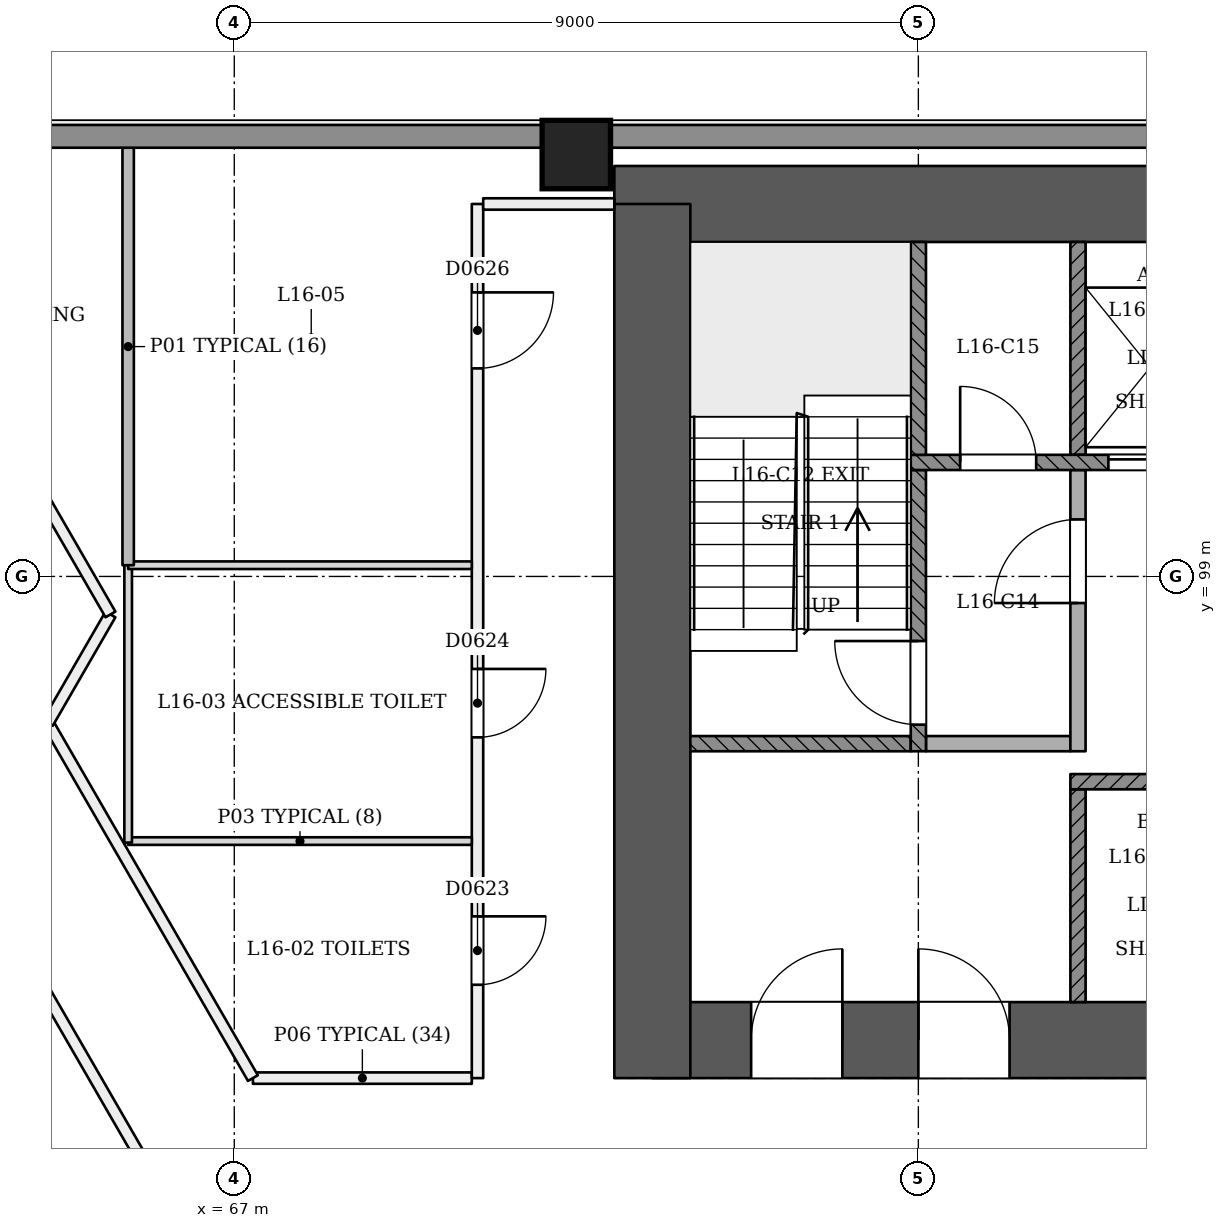
"""IFC4 building model, lengths in metres.
Left out: names, types, materials, properties, quantities, classifications, styles, units other than length and angle.
Written with IfcOpenShell. Run it as: python <this file> out.ifc"""

import sys

from ifc_helpers import new_model, si_unit, direction, frame, frame_2d, origin, origin_2d, place, context, subcontext, project, spatial, rectangle, extrude, element, fill, save


model = new_model("IFC4")
c1 = context("Model", 3, precision=1e-05, world=origin(), true_north=direction((0.0, 1.0)))
c2 = subcontext(c1, "Body", "Model", "MODEL_VIEW")
j1 = project(units=[si_unit("LENGTHUNIT", "METRE"), si_unit("PLANEANGLEUNIT", "RADIAN")], contexts=[c1])
p1 = place(None, origin())
s1 = spatial("IfcSite", under=j1, at=p1, CompositionType="ELEMENT")
p2 = place(p1, origin())
s2 = spatial("IfcBuilding", under=s1, at=p2, CompositionType="ELEMENT")
p3 = place(p2, frame((0.0, 0.0, 66.6)))
s3 = spatial("IfcBuildingStorey", under=s2, at=p3, CompositionType="ELEMENT", Elevation=66.6)
p4 = place(p3, frame((72.5, 92.9, 0.0), z_axis=(0.0, 0.0, 1.0), x_axis=(1.0, 0.0, 0.0)))
e1 = element("IfcWall", 1, at=p4, inside=s3, PredefinedType="SHEAR", context=c2, shape_type="SweptSolid", body=[
    extrude(rectangle(XDim=25.5, YDim=1.0, at=frame_2d((12.75, 0.0))), origin(), (0.0, 0.0, 1.0), 3.6),
])
p5 = place(p4, frame((1.3, 0.0, 0.0)))
e2 = element("IfcOpeningElement", 2, at=p5, cuts=e1, PredefinedType="OPENING", context=c2, shape_type="SweptSolid", body=[
    extrude(rectangle(XDim=1.2, YDim=2.1, at=frame_2d((0.6, 1.05))), frame((0.0, 0.51, 0.0), z_axis=(0.0, -1.0, 0.0), x_axis=(1.0, 0.0, 0.0)), (0.0, 0.0, 1.0), 1.021),
])
p6 = place(p4, frame((3.5, 0.0, 0.0)))
e3 = element("IfcOpeningElement", 3, at=p6, cuts=e1, PredefinedType="OPENING", context=c2, shape_type="SweptSolid", body=[
    extrude(rectangle(XDim=1.2, YDim=2.1, at=frame_2d((0.6, 1.05))), frame((0.0, 0.51, 0.0), z_axis=(0.0, -1.0, 0.0), x_axis=(1.0, 0.0, 0.0)), (0.0, 0.0, 1.0), 1.021),
])
p7 = place(p4, frame((13.5, 0.0, 0.0)))
e4 = element("IfcOpeningElement", 4, at=p7, cuts=e1, PredefinedType="OPENING", context=c2, shape_type="SweptSolid", body=[
    extrude(rectangle(XDim=1.2, YDim=2.1, at=frame_2d((0.6, 1.05))), frame((0.0, 0.51, 0.0), z_axis=(0.0, -1.0, 0.0), x_axis=(1.0, 0.0, 0.0)), (0.0, 0.0, 1.0), 1.021),
])
p8 = place(p4, frame((16.363, 0.0, 0.0)))
e5 = element("IfcOpeningElement", 5, at=p8, cuts=e1, PredefinedType="OPENING", context=c2, shape_type="SweptSolid", body=[
    extrude(rectangle(XDim=1.0, YDim=2.1, at=frame_2d((0.5, 1.05))), frame((0.0, 0.51, 0.0), z_axis=(0.0, -1.0, 0.0), x_axis=(1.0, 0.0, 0.0)), (0.0, 0.0, 1.0), 1.021),
])
p9 = place(p4, frame((19.8, 0.0, 0.0)))
e6 = element("IfcOpeningElement", 6, at=p9, cuts=e1, PredefinedType="OPENING", context=c2, shape_type="SweptSolid", body=[
    extrude(rectangle(XDim=1.0, YDim=2.1, at=frame_2d((0.5, 1.05))), frame((0.0, 0.51, 0.0), z_axis=(0.0, -1.0, 0.0), x_axis=(1.0, 0.0, 0.0)), (0.0, 0.0, 1.0), 1.021),
])
p10 = place(p4, frame((22.788, 0.0, 0.0)))
e7 = element("IfcOpeningElement", 7, at=p10, cuts=e1, PredefinedType="OPENING", context=c2, shape_type="SweptSolid", body=[
    extrude(rectangle(XDim=1.0, YDim=2.1, at=frame_2d((0.5, 1.05))), frame((0.0, 0.51, 0.0), z_axis=(0.0, -1.0, 0.0), x_axis=(1.0, 0.0, 0.0)), (0.0, 0.0, 1.0), 1.021),
])
p11 = place(p3, frame((97.5, 103.9, 0.0), z_axis=(0.0, 0.0, 1.0), x_axis=(-1.0, 0.0, 0.0)))
e8 = element("IfcWall", 8, at=p11, inside=s3, PredefinedType="SHEAR", context=c2, shape_type="SweptSolid", body=[
    extrude(rectangle(XDim=25.5, YDim=1.0, at=frame_2d((12.75, 0.0))), origin(), (0.0, 0.0, 1.0), 3.6),
])
p12 = place(p3, frame((72.5, 103.9, 0.0), z_axis=(0.0, 0.0, 1.0), x_axis=(0.0, -1.0, 0.0)))
e9 = element("IfcWall", 9, at=p12, inside=s3, PredefinedType="SHEAR", context=c2, shape_type="SweptSolid", body=[
    extrude(rectangle(XDim=11.5, YDim=1.0, at=frame_2d((5.75, 0.0))), origin(), (0.0, 0.0, 1.0), 3.6),
])
p13 = place(p3, frame((71.5, 104.55, 0.0), z_axis=(0.0, 0.0, 1.0), x_axis=(1.0, 0.0, 0.0)))
e10 = element("IfcColumn", 10, at=p13, inside=s3, PredefinedType="COLUMN", context=c2, shape_type="SweptSolid", body=[
    extrude(rectangle(XDim=0.9, YDim=0.9, at=origin_2d()), origin(), (0.0, 0.0, 1.0), 3.6),
])
p14 = place(p3, frame((70.125, 92.4, 0.0), z_axis=(0.0, 0.0, 1.0), x_axis=(-1.0, 0.0, 0.0)))
e11 = element("IfcWall", 11, at=p14, inside=s3, PredefinedType="PARTITIONING", context=c2, shape_type="SweptSolid", body=[
    extrude(rectangle(XDim=2.88, YDim=0.15, at=frame_2d((1.44, 0.0))), origin(), (0.0, 0.0, 1.0), 3.1),
])
p15 = place(p3, frame((67.245, 92.4, 0.0), z_axis=(0.0, 0.0, 1.0), x_axis=(-0.499997913005, 0.866026608708, 0.0)))
e12 = element("IfcWall", 12, at=p15, inside=s3, PredefinedType="PARTITIONING", context=c2, shape_type="SweptSolid", body=[
    extrude(rectangle(XDim=5.396, YDim=0.15, at=frame_2d((2.698, 0.0))), origin(), (0.0, 0.0, 1.0), 3.1),
])
p16 = place(p3, frame((70.2, 103.9, 0.0), z_axis=(0.0, 0.0, 1.0), x_axis=(0.0, -1.0, 0.0)))
e13 = element("IfcWall", 13, at=p16, inside=s3, PredefinedType="PARTITIONING", context=c2, shape_type="SweptSolid", body=[
    extrude(rectangle(XDim=11.5, YDim=0.15, at=frame_2d((5.75, 0.0))), origin(), (0.0, 0.0, 1.0), 2.6),
])
p17 = place(p16, frame((9.372, 0.0, 0.0)))
e14 = element("IfcOpeningElement", 14, at=p17, cuts=e13, PredefinedType="OPENING", context=c2, shape_type="SweptSolid", body=[
    extrude(rectangle(XDim=0.9, YDim=2.1, at=frame_2d((0.45, 1.05))), frame((0.0, 0.085, 0.0), z_axis=(0.0, -1.0, 0.0), x_axis=(1.0, 0.0, 0.0)), (0.0, 0.0, 1.0), 0.171),
])
p18 = place(p16, frame((6.117, 0.0, 0.0)))
e15 = element("IfcOpeningElement", 15, at=p18, cuts=e13, PredefinedType="OPENING", context=c2, shape_type="SweptSolid", body=[
    extrude(rectangle(XDim=0.9, YDim=2.1, at=frame_2d((0.45, 1.05))), frame((0.0, 0.085, 0.0), z_axis=(0.0, -1.0, 0.0), x_axis=(1.0, 0.0, 0.0)), (0.0, 0.0, 1.0), 0.171),
])
p19 = place(p16, frame((1.163, 0.0, 0.0)))
e16 = element("IfcOpeningElement", 16, at=p19, cuts=e13, PredefinedType="OPENING", context=c2, shape_type="SweptSolid", body=[
    extrude(rectangle(XDim=1.0, YDim=2.1, at=frame_2d((0.5, 1.05))), frame((0.0, 0.085, 0.0), z_axis=(0.0, -1.0, 0.0), x_axis=(1.0, 0.0, 0.0)), (0.0, 0.0, 1.0), 0.171),
])
p20 = place(p3, frame((64.547, 97.073, 0.0), z_axis=(0.0, 0.0, 1.0), x_axis=(0.500043078269, 0.866000531106, 0.0)))
e17 = element("IfcWall", 17, at=p20, inside=s3, PredefinedType="PARTITIONING", context=c2, shape_type="SweptSolid", body=[
    extrude(rectangle(XDim=1.648, YDim=0.15, at=frame_2d((0.824, 0.0))), origin(), (0.0, 0.0, 1.0), 3.1),
])
p21 = place(p3, frame((65.371, 98.5, 0.0), z_axis=(0.0, 0.0, 1.0), x_axis=(-0.500005024956, 0.866022502605, 0.0)))
e18 = element("IfcWall", 18, at=p21, inside=s3, PredefinedType="PARTITIONING", context=c2, shape_type="SweptSolid", body=[
    extrude(rectangle(XDim=2.194, YDim=0.15, at=frame_2d((1.097, 0.0))), origin(), (0.0, 0.0, 1.0), 3.1),
])
p22 = place(p3, frame((72.0, 103.9, 0.0), z_axis=(0.0, 0.0, 1.0), x_axis=(-1.0, 0.0, 0.0)))
e19 = element("IfcWall", 19, at=p22, inside=s3, PredefinedType="PARTITIONING", context=c2, shape_type="SweptSolid", body=[
    extrude(rectangle(XDim=1.725, YDim=0.15, at=frame_2d((0.863, 0.0))), origin(), (0.0, 0.0, 1.0), 2.6),
])
p23 = place(p3, frame((62.458, 97.093, 0.0), z_axis=(0.0, 0.0, 1.0), x_axis=(0.499998802074, -0.866026095406, 0.0)))
e20 = element("IfcWall", 20, at=p23, inside=s3, PredefinedType="PARTITIONING", context=c2, shape_type="SweptSolid", body=[
    extrude(rectangle(XDim=43.437, YDim=0.15, at=frame_2d((21.719, 0.0))), origin(), (0.0, 0.0, 1.0), 2.7),
])
p24 = place(p23, frame((0.286, 0.0, 0.0)))
e21 = element("IfcOpeningElement", 21, at=p24, cuts=e20, PredefinedType="OPENING", context=c2, shape_type="SweptSolid", body=[
    extrude(rectangle(XDim=1.2, YDim=2.1, at=frame_2d((0.6, 1.05))), frame((0.0, 0.085, 0.0), z_axis=(0.0, -1.0, 0.0), x_axis=(1.0, 0.0, 0.0)), (0.0, 0.0, 1.0), 0.171),
])
p25 = place(p23, frame((12.13, 0.0, 0.0)))
e22 = element("IfcOpeningElement", 22, at=p25, cuts=e20, PredefinedType="OPENING", context=c2, shape_type="SweptSolid", body=[
    extrude(rectangle(XDim=1.2, YDim=2.1, at=frame_2d((0.6, 1.05))), frame((0.0, 0.085, 0.0), z_axis=(0.0, -1.0, 0.0), x_axis=(1.0, 0.0, 0.0)), (0.0, 0.0, 1.0), 0.171),
])
p26 = place(p23, frame((18.98, 0.0, 0.0)))
e23 = element("IfcOpeningElement", 23, at=p26, cuts=e20, PredefinedType="OPENING", context=c2, shape_type="SweptSolid", body=[
    extrude(rectangle(XDim=1.0, YDim=2.1, at=frame_2d((0.5, 1.05))), frame((0.0, 0.085, 0.0), z_axis=(0.0, -1.0, 0.0), x_axis=(1.0, 0.0, 0.0)), (0.0, 0.0, 1.0), 0.171),
])
p27 = place(p23, frame((27.88, 0.0, 0.0)))
e24 = element("IfcOpeningElement", 24, at=p27, cuts=e20, PredefinedType="OPENING", context=c2, shape_type="SweptSolid", body=[
    extrude(rectangle(XDim=1.2, YDim=2.1, at=frame_2d((0.6, 1.05))), frame((0.0, 0.085, 0.0), z_axis=(0.0, -1.0, 0.0), x_axis=(1.0, 0.0, 0.0)), (0.0, 0.0, 1.0), 0.171),
])
p28 = place(p23, frame((38.745, 0.0, 0.0)))
e25 = element("IfcOpeningElement", 25, at=p28, cuts=e20, PredefinedType="OPENING", context=c2, shape_type="SweptSolid", body=[
    extrude(rectangle(XDim=1.2, YDim=2.1, at=frame_2d((0.6, 1.05))), frame((0.0, 0.085, 0.0), z_axis=(0.0, -1.0, 0.0), x_axis=(1.0, 0.0, 0.0)), (0.0, 0.0, 1.0), 0.171),
])
p29 = place(p3, frame((70.125, 95.518, 0.0), z_axis=(0.0, 0.0, 1.0), x_axis=(-1.0, 0.0, 0.0)))
e26 = element("IfcWall", 26, at=p29, inside=s3, PredefinedType="PARTITIONING", context=c2, shape_type="SweptSolid", body=[
    extrude(rectangle(XDim=4.521, YDim=0.1, at=frame_2d((2.26, 0.0))), origin(), (0.0, 0.0, 1.0), 3.1),
])
p30 = place(p3, frame((65.604, 99.168, 0.0), z_axis=(0.0, 0.0, 1.0), x_axis=(0.0, -1.0, 0.0)))
e27 = element("IfcWall", 27, at=p30, inside=s3, PredefinedType="PARTITIONING", context=c2, shape_type="SweptSolid", body=[
    extrude(rectangle(XDim=3.669, YDim=0.1, at=frame_2d((1.835, 0.0))), origin(), (0.0, 0.0, 1.0), 3.1),
])
p31 = place(p3, frame((70.125, 99.148, 0.0), z_axis=(0.0, 0.0, 1.0), x_axis=(-1.0, 0.0, 0.0)))
e28 = element("IfcWall", 28, at=p31, inside=s3, PredefinedType="PARTITIONING", context=c2, shape_type="SweptSolid", body=[
    extrude(rectangle(XDim=4.521, YDim=0.1, at=frame_2d((2.26, 0.0))), origin(), (0.0, 0.0, 1.0), 3.1),
])
p32 = place(p3, frame((65.604, 99.148, 0.0), z_axis=(0.0, 0.0, 1.0), x_axis=(0.0, 1.0, 0.0)))
e29 = element("IfcWall", 29, at=p32, inside=s3, PredefinedType="PARTITIONING", context=c2, shape_type="SweptSolid", body=[
    extrude(rectangle(XDim=5.752, YDim=0.15, at=frame_2d((2.876, 0.0))), origin(), (0.0, 0.0, 1.0), 2.6),
])
p33 = place(p3, frame((59.54, 104.79, 0.0), z_axis=(0.0, 0.0, 1.0), x_axis=(1.0, 0.0, 0.0)))
e30 = element("IfcWall", 30, at=p33, inside=s3, PredefinedType="SOLIDWALL", context=c2, shape_type="SweptSolid", body=[
    extrude(rectangle(XDim=50.92, YDim=0.3, at=frame_2d((25.46, 0.0))), origin(), (0.0, 0.0, 1.0), 2.6),
])
p34 = place(p3, frame((78.1, 93.4, 0.0), z_axis=(0.0, 0.0, 1.0), x_axis=(0.0, 1.0, 0.0)))
e31 = element("IfcWall", 31, at=p34, inside=s3, PredefinedType="SOLIDWALL", context=c2, shape_type="SweptSolid", body=[
    extrude(rectangle(XDim=2.8, YDim=0.2, at=frame_2d((1.4, 0.0))), origin(), (0.0, 0.0, 1.0), 3.1),
])
p35 = place(p3, frame((78.0, 96.3, 0.0), z_axis=(0.0, 0.0, 1.0), x_axis=(1.0, 0.0, 0.0)))
e32 = element("IfcWall", 32, at=p35, inside=s3, PredefinedType="SOLIDWALL", context=c2, shape_type="SweptSolid", body=[
    extrude(rectangle(XDim=7.8, YDim=0.2, at=frame_2d((3.9, 0.0))), origin(), (0.0, 0.0, 1.0), 3.1),
])
p36 = place(p3, frame((73.0, 96.8, 0.0), z_axis=(0.0, 0.0, 1.0), x_axis=(1.0, 0.0, 0.0)))
e33 = element("IfcWall", 33, at=p36, inside=s3, PredefinedType="SOLIDWALL", context=c2, shape_type="SweptSolid", body=[
    extrude(rectangle(XDim=2.9, YDim=0.2, at=frame_2d((1.45, 0.0))), origin(), (0.0, 0.0, 1.0), 3.1),
])
p37 = place(p3, frame((76.0, 96.7, 0.0), z_axis=(0.0, 0.0, 1.0), x_axis=(0.0, 1.0, 0.0)))
e34 = element("IfcWall", 34, at=p37, inside=s3, PredefinedType="SOLIDWALL", context=c2, shape_type="SweptSolid", body=[
    extrude(rectangle(XDim=3.7, YDim=0.2, at=frame_2d((1.85, 0.0))), origin(), (0.0, 0.0, 1.0), 3.1),
])
p38 = place(p37, frame((0.35, 0.0, 0.0)))
e35 = element("IfcOpeningElement", 35, at=p38, cuts=e34, PredefinedType="OPENING", context=c2, shape_type="SweptSolid", body=[
    extrude(rectangle(XDim=1.1, YDim=2.1, at=frame_2d((0.55, 1.05))), frame((0.0, 0.11, 0.0), z_axis=(0.0, -1.0, 0.0), x_axis=(1.0, 0.0, 0.0)), (0.0, 0.0, 1.0), 0.221),
])
p39 = place(p3, frame((76.1, 96.8, 0.0), z_axis=(0.0, 0.0, 1.0), x_axis=(1.0, 0.0, 0.0)))
e36 = element("IfcWall", 36, at=p39, inside=s3, PredefinedType="PARTITIONING", context=c2, shape_type="SweptSolid", body=[
    extrude(rectangle(XDim=1.9, YDim=0.2, at=frame_2d((0.95, 0.0))), origin(), (0.0, 0.0, 1.0), 3.1),
])
p40 = place(p3, frame((78.1, 96.7, 0.0), z_axis=(0.0, 0.0, 1.0), x_axis=(0.0, 1.0, 0.0)))
e37 = element("IfcWall", 37, at=p40, inside=s3, PredefinedType="PARTITIONING", context=c2, shape_type="SweptSolid", body=[
    extrude(rectangle(XDim=3.7, YDim=0.2, at=frame_2d((1.85, 0.0))), origin(), (0.0, 0.0, 1.0), 3.1),
])
p41 = place(p40, frame((1.95, 0.0, 0.0)))
e38 = element("IfcOpeningElement", 38, at=p41, cuts=e37, PredefinedType="OPENING", context=c2, shape_type="SweptSolid", body=[
    extrude(rectangle(XDim=1.1, YDim=2.1, at=frame_2d((0.55, 1.05))), frame((0.0, 0.11, 0.0), z_axis=(0.0, -1.0, 0.0), x_axis=(1.0, 0.0, 0.0)), (0.0, 0.0, 1.0), 0.221),
])
p42 = place(p3, frame((75.9, 100.5, 0.0), z_axis=(0.0, 0.0, 1.0), x_axis=(1.0, 0.0, 0.0)))
e39 = element("IfcWall", 39, at=p42, inside=s3, PredefinedType="SOLIDWALL", context=c2, shape_type="SweptSolid", body=[
    extrude(rectangle(XDim=18.2, YDim=0.2, at=frame_2d((9.1, 0.0))), origin(), (0.0, 0.0, 1.0), 3.1),
])
p43 = place(p42, frame((2.6, 0.0, 0.0)))
e40 = element("IfcOpeningElement", 40, at=p43, cuts=e39, PredefinedType="OPENING", context=c2, shape_type="SweptSolid", body=[
    extrude(rectangle(XDim=1.1, YDim=2.1, at=frame_2d((0.55, 1.05))), frame((0.0, 0.11, 0.0), z_axis=(0.0, -1.0, 0.0), x_axis=(1.0, 0.0, 0.0)), (0.0, 0.0, 1.0), 0.221),
])
p44 = place(p42, frame((4.5, 0.0, 0.0)))
e41 = element("IfcOpeningElement", 41, at=p44, cuts=e39, PredefinedType="OPENING", context=c2, shape_type="SweptSolid", body=[
    extrude(rectangle(XDim=1.1, YDim=2.1, at=frame_2d((0.55, 1.05))), frame((0.0, 0.11, 0.0), z_axis=(0.0, -1.0, 0.0), x_axis=(1.0, 0.0, 0.0)), (0.0, 0.0, 1.0), 0.221),
])
p45 = place(p42, frame((6.4, 0.0, 0.0)))
e42 = element("IfcOpeningElement", 42, at=p45, cuts=e39, PredefinedType="OPENING", context=c2, shape_type="SweptSolid", body=[
    extrude(rectangle(XDim=1.1, YDim=2.1, at=frame_2d((0.55, 1.05))), frame((0.0, 0.11, 0.0), z_axis=(0.0, -1.0, 0.0), x_axis=(1.0, 0.0, 0.0)), (0.0, 0.0, 1.0), 0.221),
])
p46 = place(p42, frame((8.3, 0.0, 0.0)))
e43 = element("IfcOpeningElement", 43, at=p46, cuts=e39, PredefinedType="OPENING", context=c2, shape_type="SweptSolid", body=[
    extrude(rectangle(XDim=1.1, YDim=2.1, at=frame_2d((0.55, 1.05))), frame((0.0, 0.11, 0.0), z_axis=(0.0, -1.0, 0.0), x_axis=(1.0, 0.0, 0.0)), (0.0, 0.0, 1.0), 0.221),
])
p47 = place(p42, frame((10.2, 0.0, 0.0)))
e44 = element("IfcOpeningElement", 44, at=p47, cuts=e39, PredefinedType="OPENING", context=c2, shape_type="SweptSolid", body=[
    extrude(rectangle(XDim=1.1, YDim=2.1, at=frame_2d((0.55, 1.05))), frame((0.0, 0.11, 0.0), z_axis=(0.0, -1.0, 0.0), x_axis=(1.0, 0.0, 0.0)), (0.0, 0.0, 1.0), 0.221),
])
p48 = place(p42, frame((12.1, 0.0, 0.0)))
e45 = element("IfcOpeningElement", 45, at=p48, cuts=e39, PredefinedType="OPENING", context=c2, shape_type="SweptSolid", body=[
    extrude(rectangle(XDim=1.1, YDim=2.1, at=frame_2d((0.55, 1.05))), frame((0.0, 0.11, 0.0), z_axis=(0.0, -1.0, 0.0), x_axis=(1.0, 0.0, 0.0)), (0.0, 0.0, 1.0), 0.221),
])
p49 = place(p42, frame((14.0, 0.0, 0.0)))
e46 = element("IfcOpeningElement", 46, at=p49, cuts=e39, PredefinedType="OPENING", context=c2, shape_type="SweptSolid", body=[
    extrude(rectangle(XDim=1.1, YDim=2.1, at=frame_2d((0.55, 1.05))), frame((0.0, 0.11, 0.0), z_axis=(0.0, -1.0, 0.0), x_axis=(1.0, 0.0, 0.0)), (0.0, 0.0, 1.0), 0.221),
])
p50 = place(p42, frame((0.65, 0.0, 0.0)))
e47 = element("IfcOpeningElement", 47, at=p50, cuts=e39, PredefinedType="OPENING", context=c2, shape_type="SweptSolid", body=[
    extrude(rectangle(XDim=1.0, YDim=2.1, at=frame_2d((0.5, 1.05))), frame((0.0, 0.11, 0.0), z_axis=(0.0, -1.0, 0.0), x_axis=(1.0, 0.0, 0.0)), (0.0, 0.0, 1.0), 0.221),
])
p51 = place(p42, frame((16.3, 0.0, 0.0)))
e48 = element("IfcOpeningElement", 48, at=p51, cuts=e39, PredefinedType="OPENING", context=c2, shape_type="SweptSolid", body=[
    extrude(rectangle(XDim=1.0, YDim=2.1, at=frame_2d((0.5, 1.05))), frame((0.0, 0.11, 0.0), z_axis=(0.0, -1.0, 0.0), x_axis=(1.0, 0.0, 0.0)), (0.0, 0.0, 1.0), 0.221),
])
for number, where, z_axis, x_axis in (
    (49, (76.0, 100.6, 0.0), (0.0, 0.0, 1.0), (0.0, 1.0, 0.0)),
    (50, (78.1, 100.6, 0.0), (0.0, 0.0, 1.0), (0.0, 1.0, 0.0)),
):
    element("IfcWall", number, at=place(p3, frame(where, z_axis=z_axis, x_axis=x_axis)), inside=s3, PredefinedType="SOLIDWALL", context=c2, shape_type="SweptSolid", body=[
        extrude(rectangle(XDim=2.8, YDim=0.2, at=frame_2d((1.4, 0.0))), origin(), (0.0, 0.0, 1.0), 3.1),
    ])
p52 = place(p17, origin())
e51 = element("IfcDoor", 51, at=p52, inside=s3, OperationType="SINGLE_SWING_LEFT", PredefinedType="NOTDEFINED", context=c2, shape_type="SweptSolid", body=[
    extrude(rectangle(XDim=0.9, YDim=2.1, at=frame_2d((0.45, 1.05))), frame((0.0, 0.025, 0.0), z_axis=(0.0, -1.0, 0.0), x_axis=(1.0, 0.0, 0.0)), (0.0, 0.0, 1.0), 0.05),
])
fill(e14, e51)
p53 = place(p18, origin())
e52 = element("IfcDoor", 52, at=p53, inside=s3, OperationType="SINGLE_SWING_LEFT", PredefinedType="NOTDEFINED", context=c2, shape_type="SweptSolid", body=[
    extrude(rectangle(XDim=0.9, YDim=2.1, at=frame_2d((0.45, 1.05))), frame((0.0, 0.025, 0.0), z_axis=(0.0, -1.0, 0.0), x_axis=(1.0, 0.0, 0.0)), (0.0, 0.0, 1.0), 0.05),
])
fill(e15, e52)
p54 = place(p19, origin())
e53 = element("IfcDoor", 53, at=p54, inside=s3, OperationType="SINGLE_SWING_LEFT", PredefinedType="NOTDEFINED", context=c2, shape_type="SweptSolid", body=[
    extrude(rectangle(XDim=1.0, YDim=2.1, at=frame_2d((0.5, 1.05))), frame((0.0, 0.025, 0.0), z_axis=(0.0, -1.0, 0.0), x_axis=(1.0, 0.0, 0.0)), (0.0, 0.0, 1.0), 0.05),
])
fill(e16, e53)
p55 = place(p43, origin())
e54 = element("IfcDoor", 54, at=p55, inside=s3, OperationType="SLIDING_TO_RIGHT", PredefinedType="NOTDEFINED", context=c2, shape_type="SweptSolid", body=[
    extrude(rectangle(XDim=1.1, YDim=2.1, at=frame_2d((0.55, 1.05))), frame((0.0, 0.025, 0.0), z_axis=(0.0, -1.0, 0.0), x_axis=(1.0, 0.0, 0.0)), (0.0, 0.0, 1.0), 0.05),
])
fill(e40, e54)
p56 = place(p38, origin())
e55 = element("IfcDoor", 55, at=p56, inside=s3, OperationType="SINGLE_SWING_RIGHT", PredefinedType="NOTDEFINED", context=c2, shape_type="SweptSolid", body=[
    extrude(rectangle(XDim=1.1, YDim=2.1, at=frame_2d((0.55, 1.05))), frame((0.0, 0.025, 0.0), z_axis=(0.0, -1.0, 0.0), x_axis=(1.0, 0.0, 0.0)), (0.0, 0.0, 1.0), 0.05),
])
fill(e35, e55)
p57 = place(p41, origin())
e56 = element("IfcDoor", 56, at=p57, inside=s3, OperationType="SINGLE_SWING_LEFT", PredefinedType="NOTDEFINED", context=c2, shape_type="SweptSolid", body=[
    extrude(rectangle(XDim=1.1, YDim=2.1, at=frame_2d((0.55, 1.05))), frame((0.0, 0.025, 0.0), z_axis=(0.0, -1.0, 0.0), x_axis=(1.0, 0.0, 0.0)), (0.0, 0.0, 1.0), 0.05),
])
fill(e38, e56)
p58 = place(p5, origin())
e57 = element("IfcDoor", 57, at=p58, inside=s3, OperationType="SINGLE_SWING_RIGHT", PredefinedType="NOTDEFINED", context=c2, shape_type="SweptSolid", body=[
    extrude(rectangle(XDim=1.2, YDim=2.1, at=frame_2d((0.6, 1.05))), frame((0.0, 0.025, 0.0), z_axis=(0.0, -1.0, 0.0), x_axis=(1.0, 0.0, 0.0)), (0.0, 0.0, 1.0), 0.05),
])
fill(e2, e57)
p59 = place(p6, origin())
e58 = element("IfcDoor", 58, at=p59, inside=s3, OperationType="SINGLE_SWING_LEFT", PredefinedType="NOTDEFINED", context=c2, shape_type="SweptSolid", body=[
    extrude(rectangle(XDim=1.2, YDim=2.1, at=frame_2d((0.6, 1.05))), frame((0.0, 0.025, 0.0), z_axis=(0.0, -1.0, 0.0), x_axis=(1.0, 0.0, 0.0)), (0.0, 0.0, 1.0), 0.05),
])
fill(e3, e58)
p60 = place(p50, origin())
e59 = element("IfcDoor", 59, at=p60, inside=s3, OperationType="SINGLE_SWING_LEFT", PredefinedType="NOTDEFINED", context=c2, shape_type="SweptSolid", body=[
    extrude(rectangle(XDim=1.0, YDim=2.1, at=frame_2d((0.5, 1.05))), frame((0.0, 0.025, 0.0), z_axis=(0.0, -1.0, 0.0), x_axis=(1.0, 0.0, 0.0)), (0.0, 0.0, 1.0), 0.05),
])
fill(e47, e59)
save(model, sys.argv[1])
